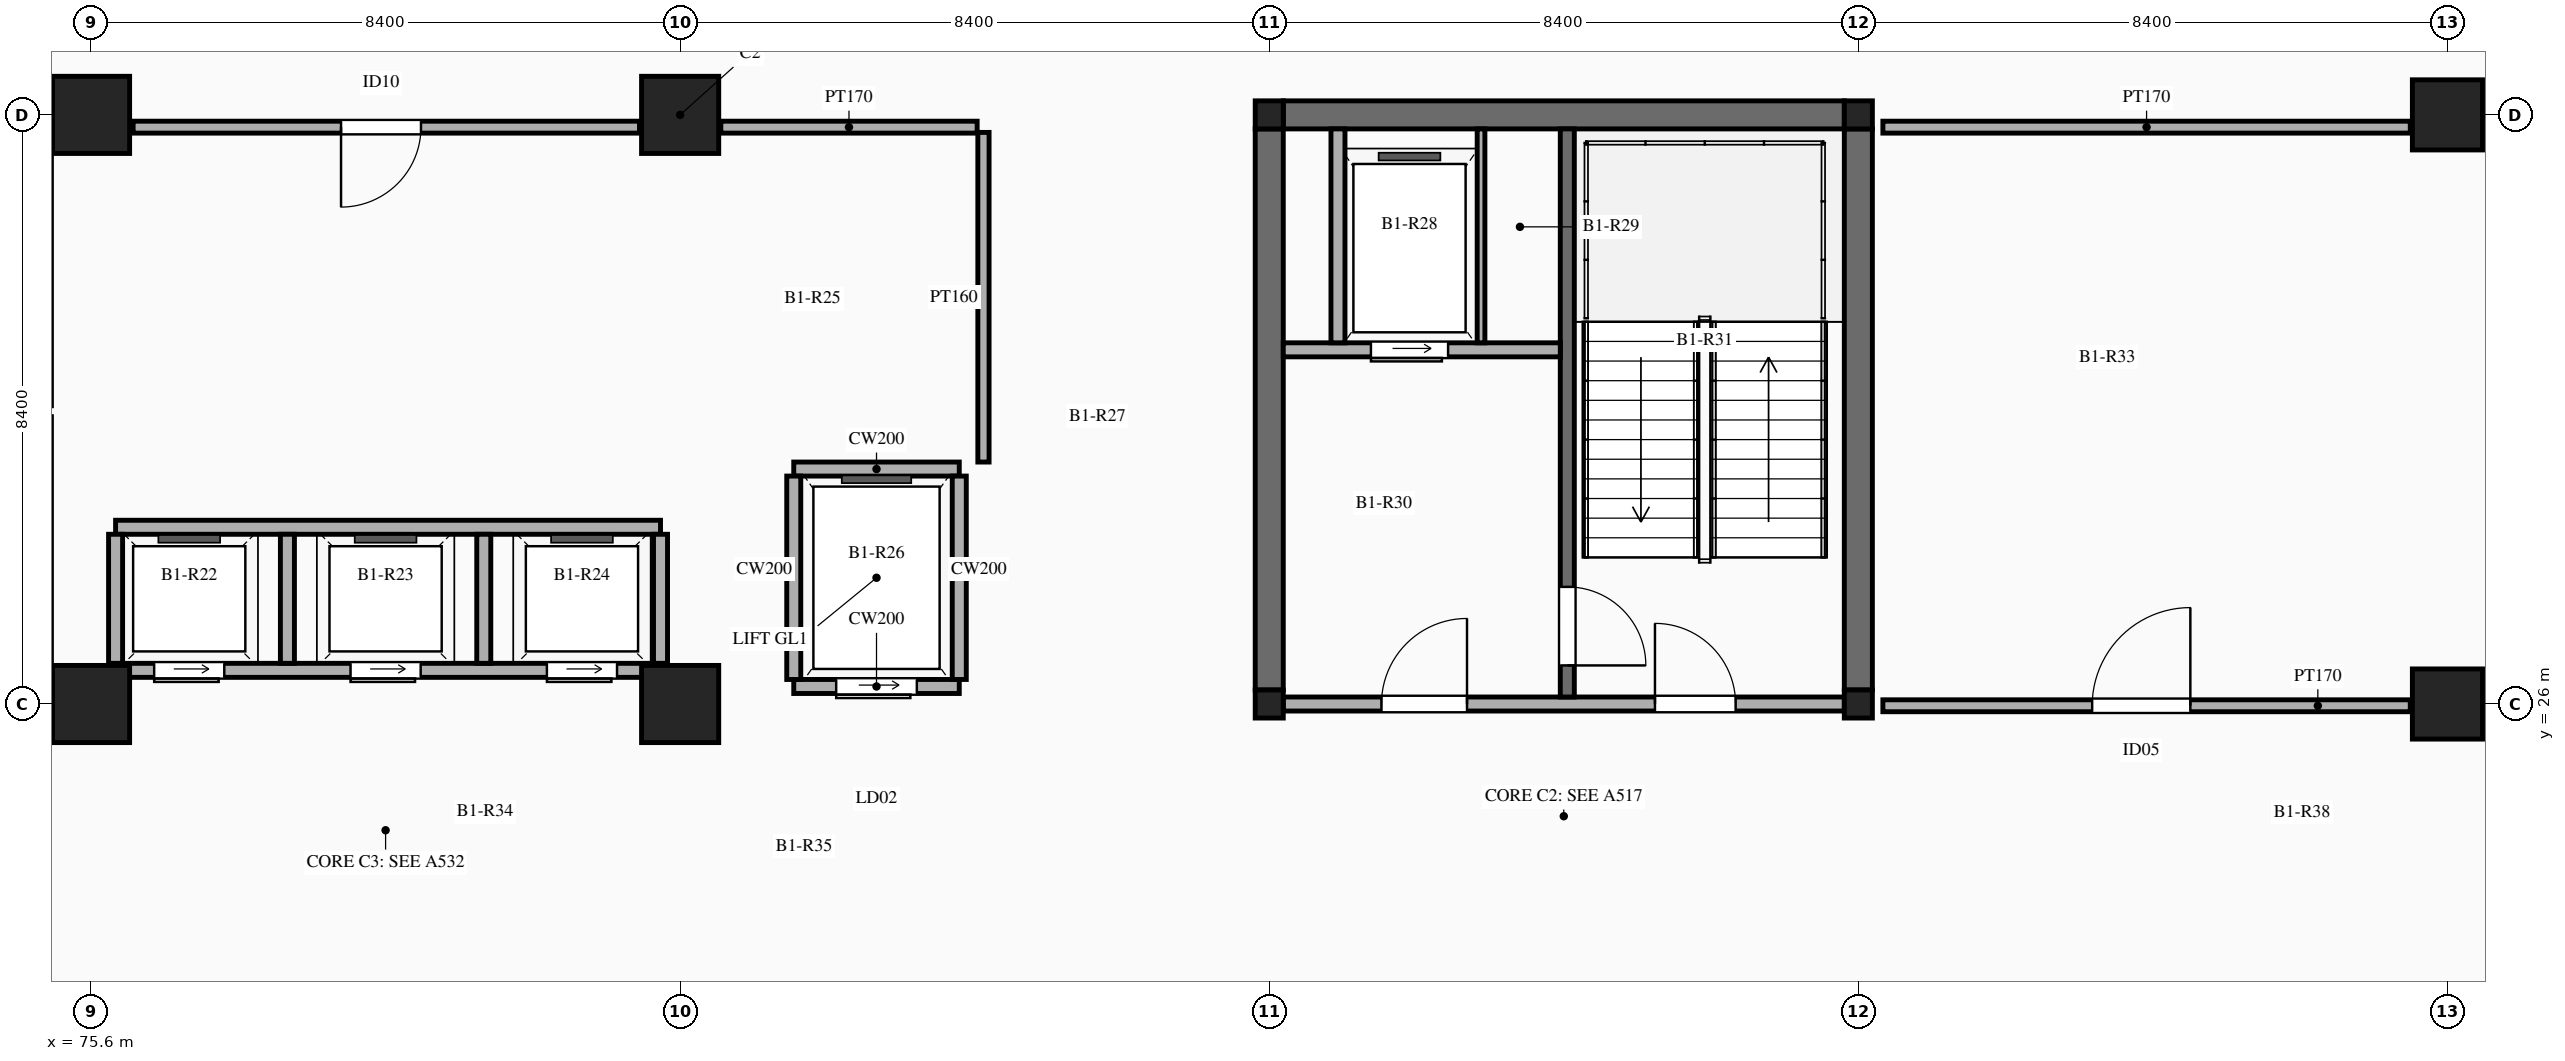
"""IFC4 building model, lengths in metres.
Left out: names, types, materials, properties, quantities, classifications, styles, units other than length and angle.
Written with IfcOpenShell. Run it as: python <this file> out.ifc"""

import sys

from ifc_helpers import new_model, si_unit, direction, frame, frame_2d, origin, origin_2d, place, context, subcontext, project, spatial, rectangle, extrude, element, fill, save


model = new_model("IFC4")
c1 = context("Model", 3, precision=1e-05, world=origin(), true_north=direction((0.0, 1.0)))
c2 = subcontext(c1, "Body", "Model", "MODEL_VIEW")
j1 = project(units=[si_unit("LENGTHUNIT", "METRE"), si_unit("PLANEANGLEUNIT", "RADIAN")], contexts=[c1])
p1 = place(None, origin())
s1 = spatial("IfcSite", under=j1, at=p1, CompositionType="ELEMENT")
p2 = place(p1, origin())
s2 = spatial("IfcBuilding", under=s1, at=p2, CompositionType="ELEMENT")
p3 = place(p2, frame((0.0, 0.0, -4.5)))
s3 = spatial("IfcBuildingStorey", under=s2, at=p3, CompositionType="ELEMENT", Elevation=-4.5)
for number, where, z_axis, x_axis in (
    (1, (75.6, 26.0, 0.0), (0.0, 0.0, 1.0), (1.0, 0.0, 0.0)),
    (2, (75.6, 34.4, 0.0), (0.0, 0.0, 1.0), (1.0, 0.0, 0.0)),
    (3, (84.0, 26.0, 0.0), (0.0, 0.0, 1.0), (1.0, 0.0, 0.0)),
    (4, (84.0, 34.4, 0.0), (0.0, 0.0, 1.0), (1.0, 0.0, 0.0)),
):
    element("IfcColumn", number, at=place(p3, frame(where, z_axis=z_axis, x_axis=x_axis)), inside=s3, PredefinedType="COLUMN", context=c2, shape_type="SweptSolid", body=[
        extrude(rectangle(XDim=1.1, YDim=1.1, at=origin_2d()), origin(), (0.0, 0.0, 1.0), 4.5),
    ])
for number, where, z_axis, x_axis in (
    (5, (92.4, 26.0, 0.0), (0.0, 0.0, 1.0), (1.0, 0.0, 0.0)),
    (6, (92.4, 34.4, 0.0), (0.0, 0.0, 1.0), (1.0, 0.0, 0.0)),
    (7, (100.8, 26.0, 0.0), (0.0, 0.0, 1.0), (1.0, 0.0, 0.0)),
    (8, (100.8, 34.4, 0.0), (0.0, 0.0, 1.0), (1.0, 0.0, 0.0)),
):
    element("IfcColumn", number, at=place(p3, frame(where, z_axis=z_axis, x_axis=x_axis)), inside=s3, PredefinedType="COLUMN", context=c2, shape_type="SweptSolid", body=[
        extrude(rectangle(XDim=0.4, YDim=0.4, at=origin_2d()), origin(), (0.0, 0.0, 1.0), 4.5),
    ])
for number, where, z_axis, x_axis in (
    (9, (109.2, 26.0, 0.0), (0.0, 0.0, 1.0), (1.0, 0.0, 0.0)),
    (10, (109.2, 34.4, 0.0), (0.0, 0.0, 1.0), (1.0, 0.0, 0.0)),
):
    element("IfcColumn", number, at=place(p3, frame(where, z_axis=z_axis, x_axis=x_axis)), inside=s3, PredefinedType="COLUMN", context=c2, shape_type="SweptSolid", body=[
        extrude(rectangle(XDim=1.0, YDim=1.0, at=origin_2d()), origin(), (0.0, 0.0, 1.0), 4.5),
    ])
for number, where, z_axis, x_axis in (
    (11, (92.4, 26.2, 0.0), (0.0, 0.0, 1.0), (0.0, 1.0, 0.0)),
    (12, (100.8, 26.2, 0.0), (0.0, 0.0, 1.0), (0.0, 1.0, 0.0)),
    (13, (92.6, 34.4, 0.0), (0.0, 0.0, 1.0), (1.0, 0.0, 0.0)),
):
    element("IfcWall", number, at=place(p3, frame(where, z_axis=z_axis, x_axis=x_axis)), inside=s3, PredefinedType="SHEAR", context=c2, shape_type="SweptSolid", body=[
        extrude(rectangle(XDim=8.0, YDim=0.4, at=frame_2d((4.0, 0.0))), origin(), (0.0, 0.0, 1.0), 4.5),
    ])
p4 = place(p3, frame((92.6, 26.0, 0.0), z_axis=(0.0, 0.0, 1.0), x_axis=(1.0, 0.0, 0.0)))
e14 = element("IfcWall", 14, at=p4, inside=s3, PredefinedType="SOLIDWALL", context=c2, shape_type="SweptSolid", body=[
    extrude(rectangle(XDim=8.0, YDim=0.2, at=frame_2d((4.0, 0.0))), origin(), (0.0, 0.0, 1.0), 3.63),
])
p5 = place(p4, frame((1.4, 0.0, 0.0)))
e15 = element("IfcOpeningElement", 15, at=p5, cuts=e14, PredefinedType="OPENING", context=c2, shape_type="SweptSolid", body=[
    extrude(rectangle(XDim=1.22, YDim=2.15, at=frame_2d((0.61, 1.075))), frame((0.0, 0.11, 0.0), z_axis=(0.0, -1.0, 0.0), x_axis=(1.0, 0.0, 0.0)), (0.0, 0.0, 1.0), 0.22),
])
p6 = place(p4, frame((5.3, 0.0, 0.0)))
e16 = element("IfcOpeningElement", 16, at=p6, cuts=e14, PredefinedType="OPENING", context=c2, shape_type="SweptSolid", body=[
    extrude(rectangle(XDim=1.15, YDim=2.15, at=frame_2d((0.575, 1.075))), frame((0.0, 0.11, 0.0), z_axis=(0.0, -1.0, 0.0), x_axis=(1.0, 0.0, 0.0)), (0.0, 0.0, 1.0), 0.22),
])
p7 = place(p3, frame((96.65, 26.1, 0.0), z_axis=(0.0, 0.0, 1.0), x_axis=(0.0, 1.0, 0.0)))
e17 = element("IfcWall", 17, at=p7, inside=s3, PredefinedType="SOLIDWALL", context=c2, shape_type="SweptSolid", body=[
    extrude(rectangle(XDim=8.1, YDim=0.2, at=frame_2d((4.05, 0.0))), origin(), (0.0, 0.0, 1.0), 4.3),
])
p8 = place(p7, frame((0.45, 0.0, 0.0)))
e18 = element("IfcOpeningElement", 18, at=p8, cuts=e17, PredefinedType="OPENING", context=c2, shape_type="SweptSolid", body=[
    extrude(rectangle(XDim=1.12, YDim=2.15, at=frame_2d((0.56, 1.075))), frame((0.0, 0.11, 0.0), z_axis=(0.0, -1.0, 0.0), x_axis=(1.0, 0.0, 0.0)), (0.0, 0.0, 1.0), 0.22),
])
p9 = place(p3, frame((92.6, 31.05, 0.0), z_axis=(0.0, 0.0, 1.0), x_axis=(1.0, 0.0, 0.0)))
e19 = element("IfcWall", 19, at=p9, inside=s3, PredefinedType="SOLIDWALL", context=c2, shape_type="SweptSolid", body=[
    extrude(rectangle(XDim=3.95, YDim=0.2, at=frame_2d((1.975, 0.0))), origin(), (0.0, 0.0, 1.0), 4.3),
])
p10 = place(p9, frame((1.25, 0.0, 0.0)))
e20 = element("IfcOpeningElement", 20, at=p10, cuts=e19, PredefinedType="OPENING", context=c2, shape_type="SweptSolid", body=[
    extrude(rectangle(XDim=1.1, YDim=2.15, at=frame_2d((0.55, 1.075))), frame((0.0, 0.11, 0.0), z_axis=(0.0, -1.0, 0.0), x_axis=(1.0, 0.0, 0.0)), (0.0, 0.0, 1.0), 0.22),
])
p11 = place(p3, frame((95.42, 31.15, 0.0), z_axis=(0.0, 0.0, 1.0), x_axis=(0.0, 1.0, 0.0)))
e21 = element("IfcWall", 21, at=p11, inside=s3, PredefinedType="PARTITIONING", context=c2, shape_type="SweptSolid", body=[
    extrude(rectangle(XDim=3.05, YDim=0.11, at=frame_2d((1.525, 0.0))), origin(), (0.0, 0.0, 1.0), 4.3),
])
p12 = place(p3, frame((93.38, 31.15, 0.0), z_axis=(0.0, 0.0, 1.0), x_axis=(0.0, 1.0, 0.0)))
e22 = element("IfcWall", 22, at=p12, inside=s3, PredefinedType="SOLIDWALL", context=c2, shape_type="SweptSolid", body=[
    extrude(rectangle(XDim=3.05, YDim=0.2, at=frame_2d((1.525, 0.0))), origin(), (0.0, 0.0, 1.0), 4.3),
])
p13 = place(p3, frame((75.95, 26.48, 0.0), z_axis=(0.0, 0.0, 1.0), x_axis=(1.0, 0.0, 0.0)))
e23 = element("IfcWall", 23, at=p13, inside=s3, PredefinedType="SOLIDWALL", context=c2, shape_type="SweptSolid", body=[
    extrude(rectangle(XDim=7.77, YDim=0.2, at=frame_2d((3.885, 0.0))), origin(), (0.0, 0.0, 1.0), 4.3),
])
p14 = place(p13, frame((0.55, 0.0, 0.0)))
e24 = element("IfcOpeningElement", 24, at=p14, cuts=e23, PredefinedType="OPENING", context=c2, shape_type="SweptSolid", body=[
    extrude(rectangle(XDim=1.0, YDim=2.15, at=frame_2d((0.5, 1.075))), frame((0.0, 0.11, 0.0), z_axis=(0.0, -1.0, 0.0), x_axis=(1.0, 0.0, 0.0)), (0.0, 0.0, 1.0), 0.22),
])
p15 = place(p13, frame((3.35, 0.0, 0.0)))
e25 = element("IfcOpeningElement", 25, at=p15, cuts=e23, PredefinedType="OPENING", context=c2, shape_type="SweptSolid", body=[
    extrude(rectangle(XDim=1.0, YDim=2.15, at=frame_2d((0.5, 1.075))), frame((0.0, 0.11, 0.0), z_axis=(0.0, -1.0, 0.0), x_axis=(1.0, 0.0, 0.0)), (0.0, 0.0, 1.0), 0.22),
])
p16 = place(p13, frame((6.15, 0.0, 0.0)))
e26 = element("IfcOpeningElement", 26, at=p16, cuts=e23, PredefinedType="OPENING", context=c2, shape_type="SweptSolid", body=[
    extrude(rectangle(XDim=1.0, YDim=2.15, at=frame_2d((0.5, 1.075))), frame((0.0, 0.11, 0.0), z_axis=(0.0, -1.0, 0.0), x_axis=(1.0, 0.0, 0.0)), (0.0, 0.0, 1.0), 0.22),
])
p17 = place(p3, frame((75.95, 28.52, 0.0), z_axis=(0.0, 0.0, 1.0), x_axis=(1.0, 0.0, 0.0)))
e27 = element("IfcWall", 27, at=p17, inside=s3, PredefinedType="SOLIDWALL", context=c2, shape_type="SweptSolid", body=[
    extrude(rectangle(XDim=7.77, YDim=0.2, at=frame_2d((3.885, 0.0))), origin(), (0.0, 0.0, 1.0), 4.3),
])
p18 = place(p3, frame((75.95, 26.58, 0.0), z_axis=(0.0, 0.0, 1.0), x_axis=(0.0, 1.0, 0.0)))
e28 = element("IfcWall", 28, at=p18, inside=s3, PredefinedType="SOLIDWALL", context=c2, shape_type="SweptSolid", body=[
    extrude(rectangle(XDim=1.84, YDim=0.2, at=frame_2d((0.92, 0.0))), origin(), (0.0, 0.0, 1.0), 3.68),
])
for number, where, z_axis, x_axis in (
    (29, (78.4, 26.58, 0.0), (0.0, 0.0, 1.0), (0.0, 1.0, 0.0)),
    (30, (81.2, 26.58, 0.0), (0.0, 0.0, 1.0), (0.0, 1.0, 0.0)),
):
    element("IfcWall", number, at=place(p3, frame(where, z_axis=z_axis, x_axis=x_axis)), inside=s3, PredefinedType="SOLIDWALL", context=c2, shape_type="SweptSolid", body=[
        extrude(rectangle(XDim=1.84, YDim=0.2, at=frame_2d((0.92, 0.0))), origin(), (0.0, 0.0, 1.0), 4.3),
    ])
p19 = place(p3, frame((83.72, 26.58, 0.0), z_axis=(0.0, 0.0, 1.0), x_axis=(0.0, 1.0, 0.0)))
e31 = element("IfcWall", 31, at=p19, inside=s3, PredefinedType="SOLIDWALL", context=c2, shape_type="SweptSolid", body=[
    extrude(rectangle(XDim=1.84, YDim=0.2, at=frame_2d((0.92, 0.0))), origin(), (0.0, 0.0, 1.0), 3.68),
])
p20 = place(p3, frame((85.62, 26.25, 0.0), z_axis=(0.0, 0.0, 1.0), x_axis=(1.0, 0.0, 0.0)))
e32 = element("IfcWall", 32, at=p20, inside=s3, PredefinedType="SOLIDWALL", context=c2, shape_type="SweptSolid", body=[
    extrude(rectangle(XDim=2.36, YDim=0.2, at=frame_2d((1.18, 0.0))), origin(), (0.0, 0.0, 1.0), 3.63),
])
p21 = place(p20, frame((0.605, 0.0, 0.0)))
e33 = element("IfcOpeningElement", 33, at=p21, cuts=e32, PredefinedType="OPENING", context=c2, shape_type="SweptSolid", body=[
    extrude(rectangle(XDim=1.15, YDim=2.2, at=frame_2d((0.575, 1.1))), frame((0.0, 0.11, 0.0), z_axis=(0.0, -1.0, 0.0), x_axis=(1.0, 0.0, 0.0)), (0.0, 0.0, 1.0), 0.22),
])
p22 = place(p3, frame((85.62, 29.35, 0.0), z_axis=(0.0, 0.0, 1.0), x_axis=(1.0, 0.0, 0.0)))
e34 = element("IfcWall", 34, at=p22, inside=s3, PredefinedType="SOLIDWALL", context=c2, shape_type="SweptSolid", body=[
    extrude(rectangle(XDim=2.36, YDim=0.2, at=frame_2d((1.18, 0.0))), origin(), (0.0, 0.0, 1.0), 4.3),
])
p23 = place(p3, frame((85.62, 26.35, 0.0), z_axis=(0.0, 0.0, 1.0), x_axis=(0.0, 1.0, 0.0)))
e35 = element("IfcWall", 35, at=p23, inside=s3, PredefinedType="SOLIDWALL", context=c2, shape_type="SweptSolid", body=[
    extrude(rectangle(XDim=2.9, YDim=0.2, at=frame_2d((1.45, 0.0))), origin(), (0.0, 0.0, 1.0), 4.3),
])
p24 = place(p3, frame((87.98, 26.35, 0.0), z_axis=(0.0, 0.0, 1.0), x_axis=(0.0, 1.0, 0.0)))
e36 = element("IfcWall", 36, at=p24, inside=s3, PredefinedType="SOLIDWALL", context=c2, shape_type="SweptSolid", body=[
    extrude(rectangle(XDim=2.9, YDim=0.2, at=frame_2d((1.45, 0.0))), origin(), (0.0, 0.0, 1.0), 3.93),
])
p25 = place(p3, frame((88.325, 29.45, 0.0), z_axis=(0.0, 0.0, 1.0), x_axis=(0.0, 1.0, 0.0)))
e37 = element("IfcWall", 37, at=p25, inside=s3, PredefinedType="PARTITIONING", context=c2, shape_type="SweptSolid", body=[
    extrude(rectangle(XDim=4.7, YDim=0.16, at=frame_2d((2.35, 0.0))), origin(), (0.0, 0.0, 1.0), 3.45),
])
p26 = place(p3, frame((76.2, 34.225, 0.0), z_axis=(0.0, 0.0, 1.0), x_axis=(1.0, 0.0, 0.0)))
e38 = element("IfcWall", 38, at=p26, inside=s3, PredefinedType="PARTITIONING", context=c2, shape_type="SweptSolid", body=[
    extrude(rectangle(XDim=7.22, YDim=0.17, at=frame_2d((3.61, 0.0))), origin(), (0.0, 0.0, 1.0), 3.45),
])
p27 = place(p26, frame((2.965, 0.0, 0.0)))
e39 = element("IfcOpeningElement", 39, at=p27, cuts=e38, PredefinedType="OPENING", context=c2, shape_type="SweptSolid", body=[
    extrude(rectangle(XDim=1.14, YDim=2.22, at=frame_2d((0.57, 1.11))), frame((0.0, 0.095, 0.0), z_axis=(0.0, -1.0, 0.0), x_axis=(1.0, 0.0, 0.0)), (0.0, 0.0, 1.0), 0.19),
])
p28 = place(p3, frame((84.58, 34.225, 0.0), z_axis=(0.0, 0.0, 1.0), x_axis=(1.0, 0.0, 0.0)))
e40 = element("IfcWall", 40, at=p28, inside=s3, PredefinedType="PARTITIONING", context=c2, shape_type="SweptSolid", body=[
    extrude(rectangle(XDim=3.655, YDim=0.17, at=frame_2d((1.828, 0.0))), origin(), (0.0, 0.0, 1.0), 3.45),
])
p29 = place(p3, frame((101.15, 25.975, 0.0), z_axis=(0.0, 0.0, 1.0), x_axis=(1.0, 0.0, 0.0)))
e41 = element("IfcWall", 41, at=p29, inside=s3, PredefinedType="PARTITIONING", context=c2, shape_type="SweptSolid", body=[
    extrude(rectangle(XDim=7.52, YDim=0.17, at=frame_2d((3.76, 0.0))), origin(), (0.0, 0.0, 1.0), 3.45),
])
p30 = place(p29, frame((2.984, 0.0, 0.0)))
e42 = element("IfcOpeningElement", 42, at=p30, cuts=e41, PredefinedType="OPENING", context=c2, shape_type="SweptSolid", body=[
    extrude(rectangle(XDim=1.4, YDim=2.25, at=frame_2d((0.7, 1.125))), frame((0.0, 0.095, 0.0), z_axis=(0.0, -1.0, 0.0), x_axis=(1.0, 0.0, 0.0)), (0.0, 0.0, 1.0), 0.19),
])
p31 = place(p3, frame((101.15, 34.225, 0.0), z_axis=(0.0, 0.0, 1.0), x_axis=(1.0, 0.0, 0.0)))
e43 = element("IfcWall", 43, at=p31, inside=s3, PredefinedType="PARTITIONING", context=c2, shape_type="SweptSolid", body=[
    extrude(rectangle(XDim=7.52, YDim=0.17, at=frame_2d((3.76, 0.0))), origin(), (0.0, 0.0, 1.0), 3.45),
])
p32 = place(p5, origin())
e44 = element("IfcDoor", 44, at=p32, inside=s3, OperationType="SINGLE_SWING_RIGHT", PredefinedType="DOOR", context=c2, shape_type="SweptSolid", body=[
    extrude(rectangle(XDim=1.22, YDim=2.15, at=frame_2d((0.61, 1.075))), frame((0.0, 0.025, 0.0), z_axis=(0.0, -1.0, 0.0), x_axis=(1.0, 0.0, 0.0)), (0.0, 0.0, 1.0), 0.05),
])
fill(e15, e44)
p33 = place(p6, origin())
e45 = element("IfcDoor", 45, at=p33, inside=s3, OperationType="SINGLE_SWING_LEFT", PredefinedType="DOOR", context=c2, shape_type="SweptSolid", body=[
    extrude(rectangle(XDim=1.15, YDim=2.15, at=frame_2d((0.575, 1.075))), frame((0.0, 0.025, 0.0), z_axis=(0.0, -1.0, 0.0), x_axis=(1.0, 0.0, 0.0)), (0.0, 0.0, 1.0), 0.05),
])
fill(e16, e45)
p34 = place(p8, frame((1.12, 0.0, 0.0), z_axis=(0.0, 0.0, 1.0), x_axis=(-1.0, 0.0, 0.0)))
e46 = element("IfcDoor", 46, at=p34, inside=s3, OperationType="SINGLE_SWING_RIGHT", PredefinedType="DOOR", context=c2, shape_type="SweptSolid", body=[
    extrude(rectangle(XDim=1.12, YDim=2.15, at=frame_2d((0.56, 1.075))), frame((0.0, 0.025, 0.0), z_axis=(0.0, -1.0, 0.0), x_axis=(1.0, 0.0, 0.0)), (0.0, 0.0, 1.0), 0.05),
])
fill(e18, e46)
p35 = place(p10, frame((1.1, 0.0, 0.0), z_axis=(0.0, 0.0, 1.0), x_axis=(-1.0, 0.0, 0.0)))
e47 = element("IfcDoor", 47, at=p35, inside=s3, OperationType="SLIDING_TO_LEFT", PredefinedType="DOOR", context=c2, shape_type="SweptSolid", body=[
    extrude(rectangle(XDim=1.1, YDim=2.15, at=frame_2d((0.55, 1.075))), frame((0.0, 0.025, 0.0), z_axis=(0.0, -1.0, 0.0), x_axis=(1.0, 0.0, 0.0)), (0.0, 0.0, 1.0), 0.05),
])
fill(e20, e47)
p36 = place(p14, frame((1.0, 0.0, 0.0), z_axis=(0.0, 0.0, 1.0), x_axis=(-1.0, 0.0, 0.0)))
e48 = element("IfcDoor", 48, at=p36, inside=s3, OperationType="SLIDING_TO_LEFT", PredefinedType="DOOR", context=c2, shape_type="SweptSolid", body=[
    extrude(rectangle(XDim=1.0, YDim=2.15, at=frame_2d((0.5, 1.075))), frame((0.0, 0.025, 0.0), z_axis=(0.0, -1.0, 0.0), x_axis=(1.0, 0.0, 0.0)), (0.0, 0.0, 1.0), 0.05),
])
fill(e24, e48)
p37 = place(p15, frame((1.0, 0.0, 0.0), z_axis=(0.0, 0.0, 1.0), x_axis=(-1.0, 0.0, 0.0)))
e49 = element("IfcDoor", 49, at=p37, inside=s3, OperationType="SLIDING_TO_LEFT", PredefinedType="DOOR", context=c2, shape_type="SweptSolid", body=[
    extrude(rectangle(XDim=1.0, YDim=2.15, at=frame_2d((0.5, 1.075))), frame((0.0, 0.025, 0.0), z_axis=(0.0, -1.0, 0.0), x_axis=(1.0, 0.0, 0.0)), (0.0, 0.0, 1.0), 0.05),
])
fill(e25, e49)
p38 = place(p16, frame((1.0, 0.0, 0.0), z_axis=(0.0, 0.0, 1.0), x_axis=(-1.0, 0.0, 0.0)))
e50 = element("IfcDoor", 50, at=p38, inside=s3, OperationType="SLIDING_TO_LEFT", PredefinedType="DOOR", context=c2, shape_type="SweptSolid", body=[
    extrude(rectangle(XDim=1.0, YDim=2.15, at=frame_2d((0.5, 1.075))), frame((0.0, 0.025, 0.0), z_axis=(0.0, -1.0, 0.0), x_axis=(1.0, 0.0, 0.0)), (0.0, 0.0, 1.0), 0.05),
])
fill(e26, e50)
p39 = place(p21, frame((1.15, 0.0, 0.0), z_axis=(0.0, 0.0, 1.0), x_axis=(-1.0, 0.0, 0.0)))
e51 = element("IfcDoor", 51, at=p39, inside=s3, OperationType="SLIDING_TO_LEFT", PredefinedType="DOOR", context=c2, shape_type="SweptSolid", body=[
    extrude(rectangle(XDim=1.15, YDim=2.2, at=frame_2d((0.575, 1.1))), frame((0.0, 0.025, 0.0), z_axis=(0.0, -1.0, 0.0), x_axis=(1.0, 0.0, 0.0)), (0.0, 0.0, 1.0), 0.05),
])
fill(e33, e51)
p40 = place(p27, frame((1.14, 0.0, 0.0), z_axis=(0.0, 0.0, 1.0), x_axis=(-1.0, 0.0, 0.0)))
e52 = element("IfcDoor", 52, at=p40, inside=s3, OperationType="SINGLE_SWING_RIGHT", PredefinedType="DOOR", context=c2, shape_type="SweptSolid", body=[
    extrude(rectangle(XDim=1.14, YDim=2.22, at=frame_2d((0.57, 1.11))), frame((0.0, 0.025, 0.0), z_axis=(0.0, -1.0, 0.0), x_axis=(1.0, 0.0, 0.0)), (0.0, 0.0, 1.0), 0.05),
])
fill(e39, e52)
p41 = place(p30, origin())
e53 = element("IfcDoor", 53, at=p41, inside=s3, OperationType="SINGLE_SWING_RIGHT", PredefinedType="DOOR", context=c2, shape_type="SweptSolid", body=[
    extrude(rectangle(XDim=1.4, YDim=2.25, at=frame_2d((0.7, 1.125))), frame((0.0, 0.025, 0.0), z_axis=(0.0, -1.0, 0.0), x_axis=(1.0, 0.0, 0.0)), (0.0, 0.0, 1.0), 0.05),
])
fill(e42, e53)
save(model, sys.argv[1])
